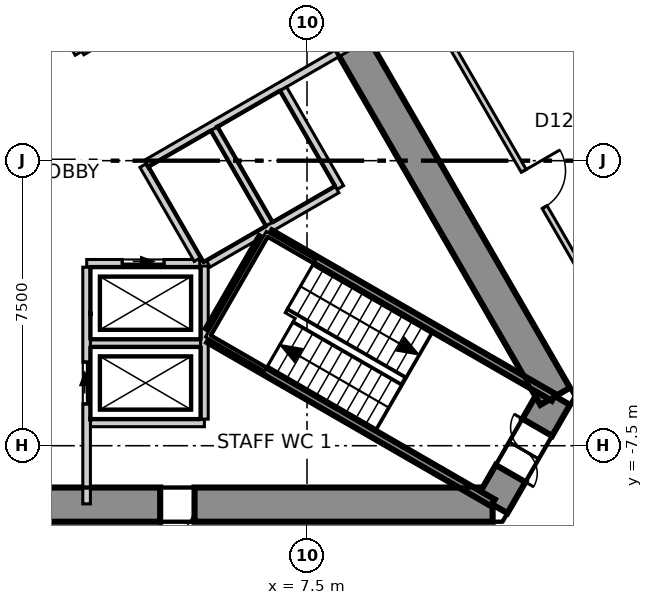
"""IFC4 building model, lengths in metres.
Left out: names, types, materials, properties, quantities, classifications, styles, units other than length and angle.
Written with IfcOpenShell. Run it as: python <this file> out.ifc"""

import sys

from ifc_helpers import new_model, si_unit, direction, frame, frame_2d, origin, place, context, subcontext, project, spatial, polyline, rectangle, outline, extrude, element, fill, save


model = new_model("IFC4")
c1 = context("Model", 3, precision=1e-05, world=origin(), true_north=direction((0.0, 1.0)))
c2 = subcontext(c1, "Body", "Model", "MODEL_VIEW")
j1 = project(units=[si_unit("LENGTHUNIT", "METRE"), si_unit("PLANEANGLEUNIT", "RADIAN")], contexts=[c1])
p1 = place(None, origin())
s1 = spatial("IfcSite", under=j1, at=p1, CompositionType="ELEMENT")
p2 = place(p1, origin())
s2 = spatial("IfcBuilding", under=s1, at=p2, CompositionType="ELEMENT")
p3 = place(p2, frame((0.0, 0.0, 59.3)))
s3 = spatial("IfcBuildingStorey", under=s2, at=p3, CompositionType="ELEMENT", Elevation=59.3)
p4 = place(p3, frame((-12.384, -9.05, -0.3), z_axis=(0.0, 0.0, 1.0), x_axis=(1.0, 0.0, 0.0)))
e1 = element("IfcWall", 1, at=p4, inside=s3, PredefinedType="SHEAR", context=c2, shape_type="SweptSolid", body=[
    extrude(outline(polyline([(-0.26, -0.45), (1.685, -0.45), (3.63, -0.45), (5.576, -0.45), (7.521, -0.45), (9.466, -0.45), (11.411, -0.45), (13.357, -0.45), (15.302, -0.45), (17.247, -0.45), (19.192, -0.45), (21.138, -0.45), (23.083, -0.45), (25.028, -0.45), (24.508, 0.45), (22.643, 0.45), (20.778, 0.45), (18.912, 0.45), (17.047, 0.45), (15.182, 0.45), (13.317, 0.45), (11.451, 0.45), (9.586, 0.45), (7.721, 0.45), (5.856, 0.45), (3.99, 0.45), (2.125, 0.45), (0.26, 0.45), (-0.26, -0.45)])), origin(), (0.0, 0.0, 1.0), 4.0),
])
p5 = place(p4, frame((3.637, 0.0, 0.3)))
e2 = element("IfcOpeningElement", 2, at=p5, cuts=e1, PredefinedType="OPENING", context=c2, shape_type="SweptSolid", body=[
    extrude(rectangle(XDim=0.9, YDim=2.1, at=frame_2d((0.45, 1.05))), frame((0.0, 0.46, 0.0), z_axis=(0.0, -1.0, 0.0), x_axis=(1.0, 0.0, 0.0)), (0.0, 0.0, 1.0), 0.92),
])
p6 = place(p4, frame((16.022, 0.0, 0.3)))
e3 = element("IfcOpeningElement", 3, at=p6, cuts=e1, PredefinedType="OPENING", context=c2, shape_type="SweptSolid", body=[
    extrude(rectangle(XDim=0.9, YDim=2.1, at=frame_2d((0.45, 1.05))), frame((0.0, 0.46, 0.0), z_axis=(0.0, -1.0, 0.0), x_axis=(1.0, 0.0, 0.0)), (0.0, 0.0, 1.0), 0.92),
])
p7 = place(p3, frame((12.384, -9.05, -0.3), z_axis=(0.0, 0.0, 1.0), x_axis=(0.500111984565, 0.865960739811, 0.0)))
e4 = element("IfcWall", 4, at=p7, inside=s3, PredefinedType="SHEAR", context=c2, shape_type="SweptSolid", body=[
    extrude(outline(polyline([(-0.26, -0.45), (1.646, -0.449), (3.551, -0.449), (3.031, 0.45), (1.646, 0.45), (0.26, 0.45), (-0.26, -0.45)])), origin(), (0.0, 0.0, 1.0), 4.0),
])
p8 = place(p7, frame((0.946, 0.0, 0.3)))
e5 = element("IfcOpeningElement", 5, at=p8, cuts=e4, PredefinedType="OPENING", context=c2, shape_type="SweptSolid", body=[
    extrude(rectangle(XDim=1.4, YDim=2.1, at=frame_2d((0.7, 1.05))), frame((0.0, 0.46, 0.0), z_axis=(0.0, -1.0, 0.0), x_axis=(1.0, 0.0, 0.0)), (0.0, 0.0, 1.0), 0.92),
])
p9 = place(p3, frame((14.03, -6.2, -0.3), z_axis=(0.0, 0.0, 1.0), x_axis=(-0.500026485275, 0.866010111964, 0.0)))
e6 = element("IfcWall", 6, at=p9, inside=s3, PredefinedType="SHEAR", context=c2, shape_type="SweptSolid", body=[
    extrude(outline(polyline([(-0.26, -0.449), (1.685, -0.449), (3.63, -0.449), (5.576, -0.449), (7.521, -0.449), (9.466, -0.449), (11.411, -0.449), (13.357, -0.449), (15.302, -0.449), (17.247, -0.45), (19.192, -0.45), (21.138, -0.45), (23.083, -0.45), (25.028, -0.45), (24.509, 0.449), (22.644, 0.449), (20.778, 0.449), (18.913, 0.449), (17.048, 0.449), (15.182, 0.449), (13.317, 0.449), (11.452, 0.449), (9.587, 0.449), (7.721, 0.45), (5.856, 0.45), (3.991, 0.45), (2.125, 0.45), (0.26, 0.45), (-0.26, -0.449)])), origin(), (0.0, 0.0, 1.0), 4.0),
])
p10 = place(p9, frame((11.484, 0.0, 0.3)))
e7 = element("IfcOpeningElement", 7, at=p10, cuts=e6, PredefinedType="OPENING", context=c2, shape_type="SweptSolid", body=[
    extrude(rectangle(XDim=1.8, YDim=2.1, at=frame_2d((0.9, 1.05))), frame((0.0, 0.46, 0.0), z_axis=(0.0, -1.0, 0.0), x_axis=(1.0, 0.0, 0.0)), (0.0, 0.0, 1.0), 0.92),
])
p11 = place(p9, frame((18.914, 0.0, 0.3)))
e8 = element("IfcOpeningElement", 8, at=p11, cuts=e6, PredefinedType="OPENING", context=c2, shape_type="SweptSolid", body=[
    extrude(rectangle(XDim=1.0, YDim=2.1, at=frame_2d((0.5, 1.05))), frame((0.0, 0.46, 0.0), z_axis=(0.0, -1.0, 0.0), x_axis=(1.0, 0.0, 0.0)), (0.0, 0.0, 1.0), 0.92),
])
p12 = place(p3, frame((34.241, -15.876, 0.0), z_axis=(0.0, 0.0, 1.0), x_axis=(-0.500006313899, 0.866021758423, 0.0)))
e9 = element("IfcWall", 9, at=p12, inside=s3, PredefinedType="ELEMENTEDWALL", context=c2, shape_type="SweptSolid", body=[
    extrude(rectangle(XDim=61.719, YDim=0.2, at=frame_2d((30.859, 0.0))), origin(), (0.0, 0.0, 1.0), 3.7),
])
p13 = place(p12, frame((2.199, 0.0, 0.9)))
e10 = element("IfcOpeningElement", 10, at=p13, cuts=e9, PredefinedType="OPENING", context=c2, shape_type="SweptSolid", body=[
    extrude(rectangle(XDim=5.6, YDim=2.5, at=frame_2d((2.8, 1.25))), frame((0.0, 0.11, 0.0), z_axis=(0.0, -1.0, 0.0), x_axis=(1.0, 0.0, 0.0)), (0.0, 0.0, 1.0), 0.22),
])
p14 = place(p12, frame((9.59, 0.0, 0.9)))
e11 = element("IfcOpeningElement", 11, at=p14, cuts=e9, PredefinedType="OPENING", context=c2, shape_type="SweptSolid", body=[
    extrude(rectangle(XDim=5.6, YDim=2.5, at=frame_2d((2.8, 1.25))), frame((0.0, 0.11, 0.0), z_axis=(0.0, -1.0, 0.0), x_axis=(1.0, 0.0, 0.0)), (0.0, 0.0, 1.0), 0.22),
])
p15 = place(p12, frame((16.982, 0.0, 0.9)))
e12 = element("IfcOpeningElement", 12, at=p15, cuts=e9, PredefinedType="OPENING", context=c2, shape_type="SweptSolid", body=[
    extrude(rectangle(XDim=5.6, YDim=2.5, at=frame_2d((2.8, 1.25))), frame((0.0, 0.11, 0.0), z_axis=(0.0, -1.0, 0.0), x_axis=(1.0, 0.0, 0.0)), (0.0, 0.0, 1.0), 0.22),
])
p16 = place(p12, frame((24.374, 0.0, 0.9)))
e13 = element("IfcOpeningElement", 13, at=p16, cuts=e9, PredefinedType="OPENING", context=c2, shape_type="SweptSolid", body=[
    extrude(rectangle(XDim=5.6, YDim=2.5, at=frame_2d((2.8, 1.25))), frame((0.0, 0.11, 0.0), z_axis=(0.0, -1.0, 0.0), x_axis=(1.0, 0.0, 0.0)), (0.0, 0.0, 1.0), 0.22),
])
p17 = place(p12, frame((31.765, 0.0, 0.9)))
e14 = element("IfcOpeningElement", 14, at=p17, cuts=e9, PredefinedType="OPENING", context=c2, shape_type="SweptSolid", body=[
    extrude(rectangle(XDim=5.6, YDim=2.5, at=frame_2d((2.8, 1.25))), frame((0.0, 0.11, 0.0), z_axis=(0.0, -1.0, 0.0), x_axis=(1.0, 0.0, 0.0)), (0.0, 0.0, 1.0), 0.22),
])
p18 = place(p12, frame((39.157, 0.0, 0.9)))
e15 = element("IfcOpeningElement", 15, at=p18, cuts=e9, PredefinedType="OPENING", context=c2, shape_type="SweptSolid", body=[
    extrude(rectangle(XDim=5.6, YDim=2.5, at=frame_2d((2.8, 1.25))), frame((0.0, 0.11, 0.0), z_axis=(0.0, -1.0, 0.0), x_axis=(1.0, 0.0, 0.0)), (0.0, 0.0, 1.0), 0.22),
])
p19 = place(p12, frame((46.549, 0.0, 0.9)))
e16 = element("IfcOpeningElement", 16, at=p19, cuts=e9, PredefinedType="OPENING", context=c2, shape_type="SweptSolid", body=[
    extrude(rectangle(XDim=5.6, YDim=2.5, at=frame_2d((2.8, 1.25))), frame((0.0, 0.11, 0.0), z_axis=(0.0, -1.0, 0.0), x_axis=(1.0, 0.0, 0.0)), (0.0, 0.0, 1.0), 0.22),
])
p20 = place(p12, frame((53.94, 0.0, 0.9)))
e17 = element("IfcOpeningElement", 17, at=p20, cuts=e9, PredefinedType="OPENING", context=c2, shape_type="SweptSolid", body=[
    extrude(rectangle(XDim=5.6, YDim=2.5, at=frame_2d((2.8, 1.25))), frame((0.0, 0.11, 0.0), z_axis=(0.0, -1.0, 0.0), x_axis=(1.0, 0.0, 0.0)), (0.0, 0.0, 1.0), 0.22),
])
p21 = place(p3, frame((0.075, 22.47, 0.0), z_axis=(0.0, 0.0, 1.0), x_axis=(0.500002280369, -0.866024087209, 0.0)))
e18 = element("IfcWall", 18, at=p21, inside=s3, PredefinedType="PARTITIONING", context=c2, shape_type="SweptSolid", body=[
    extrude(rectangle(XDim=38.844, YDim=0.15, at=frame_2d((19.422, 0.0))), origin(), (0.0, 0.0, 1.0), 3.7),
])
p22 = place(p21, frame((36.044, 0.0, 0.0)))
e19 = element("IfcOpeningElement", 19, at=p22, cuts=e18, PredefinedType="OPENING", context=c2, shape_type="SweptSolid", body=[
    extrude(rectangle(XDim=1.1, YDim=2.1, at=frame_2d((0.55, 1.05))), frame((0.0, 0.085, 0.0), z_axis=(0.0, -1.0, 0.0), x_axis=(1.0, 0.0, 0.0)), (0.0, 0.0, 1.0), 0.17),
])
p23 = place(p21, frame((26.255, 0.0, 0.0)))
e20 = element("IfcOpeningElement", 20, at=p23, cuts=e18, PredefinedType="OPENING", context=c2, shape_type="SweptSolid", body=[
    extrude(rectangle(XDim=1.1, YDim=2.1, at=frame_2d((0.55, 1.05))), frame((0.0, 0.085, 0.0), z_axis=(0.0, -1.0, 0.0), x_axis=(1.0, 0.0, 0.0)), (0.0, 0.0, 1.0), 0.17),
])
p24 = place(p21, frame((9.173, 0.0, 0.0)))
e21 = element("IfcOpeningElement", 21, at=p24, cuts=e18, PredefinedType="OPENING", context=c2, shape_type="SweptSolid", body=[
    extrude(rectangle(XDim=1.1, YDim=2.1, at=frame_2d((0.55, 1.05))), frame((0.0, 0.085, 0.0), z_axis=(0.0, -1.0, 0.0), x_axis=(1.0, 0.0, 0.0)), (0.0, 0.0, 1.0), 0.17),
])
p25 = place(p21, frame((17.373, 0.0, 0.0)))
e22 = element("IfcOpeningElement", 22, at=p25, cuts=e18, PredefinedType="OPENING", context=c2, shape_type="SweptSolid", body=[
    extrude(rectangle(XDim=0.9, YDim=2.1, at=frame_2d((0.45, 1.05))), frame((0.0, 0.085, 0.0), z_axis=(0.0, -1.0, 0.0), x_axis=(1.0, 0.0, 0.0)), (0.0, 0.0, 1.0), 0.17),
])
p26 = place(p21, frame((14.173, 0.0, 0.0)))
e23 = element("IfcOpeningElement", 23, at=p26, cuts=e18, PredefinedType="OPENING", context=c2, shape_type="SweptSolid", body=[
    extrude(rectangle(XDim=0.9, YDim=2.1, at=frame_2d((0.45, 1.05))), frame((0.0, 0.085, 0.0), z_axis=(0.0, -1.0, 0.0), x_axis=(1.0, 0.0, 0.0)), (0.0, 0.0, 1.0), 0.17),
])
p27 = place(p21, frame((11.273, 0.0, 0.0)))
e24 = element("IfcOpeningElement", 24, at=p27, cuts=e18, PredefinedType="OPENING", context=c2, shape_type="SweptSolid", body=[
    extrude(rectangle(XDim=1.0, YDim=2.1, at=frame_2d((0.5, 1.05))), frame((0.0, 0.085, 0.0), z_axis=(0.0, -1.0, 0.0), x_axis=(1.0, 0.0, 0.0)), (0.0, 0.0, 1.0), 0.17),
])
p28 = place(p21, frame((1.689, 0.0, 0.0)))
e25 = element("IfcOpeningElement", 25, at=p28, cuts=e18, PredefinedType="OPENING", context=c2, shape_type="SweptSolid", body=[
    extrude(rectangle(XDim=1.1, YDim=2.1, at=frame_2d((0.55, 1.05))), frame((0.0, 0.085, 0.0), z_axis=(0.0, -1.0, 0.0), x_axis=(1.0, 0.0, 0.0)), (0.0, 0.0, 1.0), 0.17),
])
p29 = place(p3, frame((12.942, 7.384, 0.0), z_axis=(0.0, 0.0, 1.0), x_axis=(0.499995423472, -0.866028046028, 0.0)))
e26 = element("IfcWall", 26, at=p29, inside=s3, PredefinedType="PARTITIONING", context=c2, shape_type="SweptSolid", body=[
    extrude(rectangle(XDim=14.633, YDim=0.15, at=frame_2d((7.316, 0.0))), origin(), (0.0, 0.0, 1.0), 3.7),
])
p30 = place(p29, frame((6.857, 0.0, 0.0)))
e27 = element("IfcOpeningElement", 27, at=p30, cuts=e26, PredefinedType="OPENING", context=c2, shape_type="SweptSolid", body=[
    extrude(rectangle(XDim=1.0, YDim=2.1, at=frame_2d((0.5, 1.05))), frame((0.0, 0.085, 0.0), z_axis=(0.0, -1.0, 0.0), x_axis=(1.0, 0.0, 0.0)), (0.0, 0.0, 1.0), 0.17),
])
p31 = place(p3, frame((1.8, -4.8, 0.0), z_axis=(0.0, 0.0, 1.0), x_axis=(1.0, 0.0, 0.0)))
e28 = element("IfcWall", 28, at=p31, inside=s3, PredefinedType="SOLIDWALL", context=c2, shape_type="SweptSolid", body=[
    extrude(rectangle(XDim=2.9, YDim=0.2, at=frame_2d((1.45, 0.0))), origin(), (0.0, 0.0, 1.0), 3.7),
])
p32 = place(p3, frame((1.8, -6.9, 0.0), z_axis=(0.0, 0.0, 1.0), x_axis=(1.0, 0.0, 0.0)))
e29 = element("IfcWall", 29, at=p32, inside=s3, PredefinedType="SOLIDWALL", context=c2, shape_type="SweptSolid", body=[
    extrude(rectangle(XDim=3.0, YDim=0.2, at=frame_2d((1.5, 0.0))), origin(), (0.0, 0.0, 1.0), 3.7),
])
p33 = place(p3, frame((1.703, -2.7, 0.0), z_axis=(0.0, 0.0, 1.0), x_axis=(1.0, 0.0, 0.0)))
e30 = element("IfcWall", 30, at=p33, inside=s3, PredefinedType="SOLIDWALL", context=c2, shape_type="SweptSolid", body=[
    extrude(rectangle(XDim=2.973, YDim=0.2, at=frame_2d((1.487, 0.0))), origin(), (0.0, 0.0, 1.0), 3.7),
])
p34 = place(p33, frame((0.936, 0.0, 0.0)))
e31 = element("IfcOpeningElement", 31, at=p34, cuts=e30, PredefinedType="OPENING", context=c2, shape_type="SweptSolid", body=[
    extrude(rectangle(XDim=1.1, YDim=2.1, at=frame_2d((0.55, 1.05))), frame((0.0, 0.11, 0.0), z_axis=(0.0, -1.0, 0.0), x_axis=(1.0, 0.0, 0.0)), (0.0, 0.0, 1.0), 0.22),
])
p35 = place(p3, frame((0.0, 5.4, 0.0), z_axis=(0.0, 0.0, 1.0), x_axis=(0.500103862429, -0.865965430478, 0.0)))
e32 = element("IfcWall", 32, at=p35, inside=s3, PredefinedType="SOLIDWALL", context=c2, shape_type="SweptSolid", body=[
    extrude(rectangle(XDim=2.973, YDim=0.2, at=frame_2d((1.487, 0.0))), origin(), (0.0, 0.0, 1.0), 3.7),
])
p36 = place(p35, frame((0.937, 0.0, 0.0)))
e33 = element("IfcOpeningElement", 33, at=p36, cuts=e32, PredefinedType="OPENING", context=c2, shape_type="SweptSolid", body=[
    extrude(rectangle(XDim=1.1, YDim=2.1, at=frame_2d((0.55, 1.05))), frame((0.0, 0.11, 0.0), z_axis=(0.0, -1.0, 0.0), x_axis=(1.0, 0.0, 0.0)), (0.0, 0.0, 1.0), 0.22),
])
p37 = place(p3, frame((3.19, -0.125, 0.0), z_axis=(0.0, 0.0, 1.0), x_axis=(0.499988658015, -0.866031951983, 0.0)))
e34 = element("IfcWall", 34, at=p37, inside=s3, PredefinedType="SOLIDWALL", context=c2, shape_type="SweptSolid", body=[
    extrude(rectangle(XDim=2.858, YDim=0.2, at=frame_2d((1.429, 0.0))), origin(), (0.0, 0.0, 1.0), 3.7),
])
p38 = place(p3, frame((1.578, 2.874, 0.0), z_axis=(0.0, 0.0, 1.0), x_axis=(0.866031483044, 0.499989470266, 0.0)))
e35 = element("IfcWall", 35, at=p38, inside=s3, PredefinedType="SOLIDWALL", context=c2, shape_type="SweptSolid", body=[
    extrude(rectangle(XDim=6.226, YDim=0.2, at=frame_2d((3.113, 0.0))), origin(), (0.0, 0.0, 1.0), 3.7),
])
p39 = place(p38, frame((2.496, 0.0, 0.0)))
e36 = element("IfcOpeningElement", 36, at=p39, cuts=e35, PredefinedType="OPENING", context=c2, shape_type="SweptSolid", body=[
    extrude(rectangle(XDim=1.1, YDim=2.1, at=frame_2d((0.55, 1.05))), frame((0.0, 0.11, 0.0), z_axis=(0.0, -1.0, 0.0), x_axis=(1.0, 0.0, 0.0)), (0.0, 0.0, 1.0), 0.22),
])
p40 = place(p3, frame((1.7, -9.03, 0.0), z_axis=(0.0, 0.0, 1.0), x_axis=(0.0, 1.0, 0.0)))
e37 = element("IfcWall", 37, at=p40, inside=s3, PredefinedType="SOLIDWALL", context=c2, shape_type="SweptSolid", body=[
    extrude(rectangle(XDim=6.227, YDim=0.2, at=frame_2d((3.114, 0.0))), origin(), (0.0, 0.0, 1.0), 3.7),
])
p41 = place(p40, frame((2.63, 0.0, 0.0)))
e38 = element("IfcOpeningElement", 38, at=p41, cuts=e37, PredefinedType="OPENING", context=c2, shape_type="SweptSolid", body=[
    extrude(rectangle(XDim=1.1, YDim=2.1, at=frame_2d((0.55, 1.05))), frame((0.0, 0.11, 0.0), z_axis=(0.0, -1.0, 0.0), x_axis=(1.0, 0.0, 0.0)), (0.0, 0.0, 1.0), 0.22),
])
p42 = place(p3, frame((4.8, -6.8, 0.0), z_axis=(0.0, 0.0, 1.0), x_axis=(0.0, 1.0, 0.0)))
e39 = element("IfcWall", 39, at=p42, inside=s3, PredefinedType="SOLIDWALL", context=c2, shape_type="SweptSolid", body=[
    extrude(rectangle(XDim=4.029, YDim=0.2, at=frame_2d((2.015, 0.0))), origin(), (0.0, 0.0, 1.0), 3.7),
])
p43 = place(p3, frame((3.278, -0.071, 0.0), z_axis=(0.0, 0.0, 1.0), x_axis=(0.865953757655, 0.500124074208, 0.0)))
e40 = element("IfcWall", 40, at=p43, inside=s3, PredefinedType="SOLIDWALL", context=c2, shape_type="SweptSolid", body=[
    extrude(rectangle(XDim=6.227, YDim=0.2, at=frame_2d((3.113, 0.0))), origin(), (0.0, 0.0, 1.0), 3.7),
])
p44 = place(p3, frame((6.876, 1.891, 0.0), z_axis=(0.0, 0.0, 1.0), x_axis=(0.499990139034, -0.866031096941, 0.0)))
e41 = element("IfcWall", 41, at=p44, inside=s3, PredefinedType="SOLIDWALL", context=c2, shape_type="SweptSolid", body=[
    extrude(rectangle(XDim=3.0, YDim=0.2, at=frame_2d((1.5, 0.0))), origin(), (0.0, 0.0, 1.0), 3.7),
])
p45 = place(p3, frame((5.057, 0.841, 0.0), z_axis=(0.0, 0.0, 1.0), x_axis=(0.50012328804, -0.865954211699, 0.0)))
e42 = element("IfcWall", 42, at=p45, inside=s3, PredefinedType="SOLIDWALL", context=c2, shape_type="SweptSolid", body=[
    extrude(rectangle(XDim=2.9, YDim=0.2, at=frame_2d((1.45, 0.0))), origin(), (0.0, 0.0, 1.0), 3.7),
])
p46 = place(p3, frame((4.9, -2.714, 0.0), z_axis=(0.0, 0.0, 1.0), x_axis=(0.865992350556, 0.500057245502, 0.0)))
e43 = element("IfcWall", 43, at=p46, inside=s3, PredefinedType="SOLIDWALL", context=c2, shape_type="SweptSolid", body=[
    extrude(rectangle(XDim=3.914, YDim=0.2, at=frame_2d((1.957, 0.0))), origin(), (0.0, 0.0, 1.0), 3.7),
])
p47 = place(p3, frame((4.929, -4.693, 0.0), z_axis=(0.0, 0.0, 1.0), x_axis=(0.866010975815, -0.500024989144, 0.0)))
e44 = element("IfcWall", 44, at=p47, inside=s3, PredefinedType="SOLIDWALL", context=c2, shape_type="SweptSolid", body=[
    extrude(rectangle(XDim=8.615, YDim=0.2, at=frame_2d((4.308, 0.0))), origin(), (0.0, 0.0, 1.0), 3.7),
])
p48 = place(p3, frame((4.929, -4.462, 0.0), z_axis=(0.0, 0.0, 1.0), x_axis=(0.500200581029, 0.865909567298, 0.0)))
e45 = element("IfcWall", 45, at=p48, inside=s3, PredefinedType="SOLIDWALL", context=c2, shape_type="SweptSolid", body=[
    extrude(rectangle(XDim=2.799, YDim=0.2, at=frame_2d((1.399, 0.0))), origin(), (0.0, 0.0, 1.0), 3.7),
])
p49 = place(p3, frame((6.529, -1.922, 0.0), z_axis=(0.0, 0.0, 1.0), x_axis=(0.866060059011, -0.499939970583, 0.0)))
e46 = element("IfcWall", 46, at=p49, inside=s3, PredefinedType="SOLIDWALL", context=c2, shape_type="SweptSolid", body=[
    extrude(rectangle(XDim=8.615, YDim=0.2, at=frame_2d((4.307, 0.0))), origin(), (0.0, 0.0, 1.0), 3.7),
])
p50 = place(p34, origin())
e47 = element("IfcDoor", 47, at=p50, inside=s3, OperationType="SLIDING_TO_LEFT", PredefinedType="DOOR", context=c2, shape_type="SweptSolid", body=[
    extrude(rectangle(XDim=1.1, YDim=2.1, at=frame_2d((0.55, 1.05))), frame((0.0, 0.025, 0.0), z_axis=(0.0, -1.0, 0.0), x_axis=(1.0, 0.0, 0.0)), (0.0, 0.0, 1.0), 0.05),
])
fill(e31, e47)
p51 = place(p41, origin())
e48 = element("IfcDoor", 48, at=p51, inside=s3, OperationType="SLIDING_TO_LEFT", PredefinedType="DOOR", context=c2, shape_type="SweptSolid", body=[
    extrude(rectangle(XDim=1.1, YDim=2.1, at=frame_2d((0.55, 1.05))), frame((0.0, 0.025, 0.0), z_axis=(0.0, -1.0, 0.0), x_axis=(1.0, 0.0, 0.0)), (0.0, 0.0, 1.0), 0.05),
])
fill(e38, e48)
p52 = place(p23, origin())
e49 = element("IfcDoor", 49, at=p52, inside=s3, OperationType="SINGLE_SWING_RIGHT", PredefinedType="DOOR", context=c2, shape_type="SweptSolid", body=[
    extrude(rectangle(XDim=1.1, YDim=2.1, at=frame_2d((0.55, 1.05))), frame((0.0, 0.025, 0.0), z_axis=(0.0, -1.0, 0.0), x_axis=(1.0, 0.0, 0.0)), (0.0, 0.0, 1.0), 0.05),
])
fill(e20, e49)
p53 = place(p8, origin())
e50 = element("IfcDoor", 50, at=p53, inside=s3, OperationType="DOUBLE_DOOR_SINGLE_SWING", PredefinedType="DOOR", context=c2, shape_type="SweptSolid", body=[
    extrude(rectangle(XDim=1.4, YDim=2.1, at=frame_2d((0.7, 1.05))), frame((0.0, 0.025, 0.0), z_axis=(0.0, -1.0, 0.0), x_axis=(1.0, 0.0, 0.0)), (0.0, 0.0, 1.0), 0.05),
])
fill(e5, e50)
p54 = place(p6, origin())
e51 = element("IfcDoor", 51, at=p54, inside=s3, OperationType="SINGLE_SWING_LEFT", PredefinedType="DOOR", context=c2, shape_type="SweptSolid", body=[
    extrude(rectangle(XDim=0.9, YDim=2.1, at=frame_2d((0.45, 1.05))), frame((0.0, 0.175, 0.0), z_axis=(0.0, -1.0, 0.0), x_axis=(1.0, 0.0, 0.0)), (0.0, 0.0, 1.0), 0.05),
])
fill(e3, e51)
save(model, sys.argv[1])
